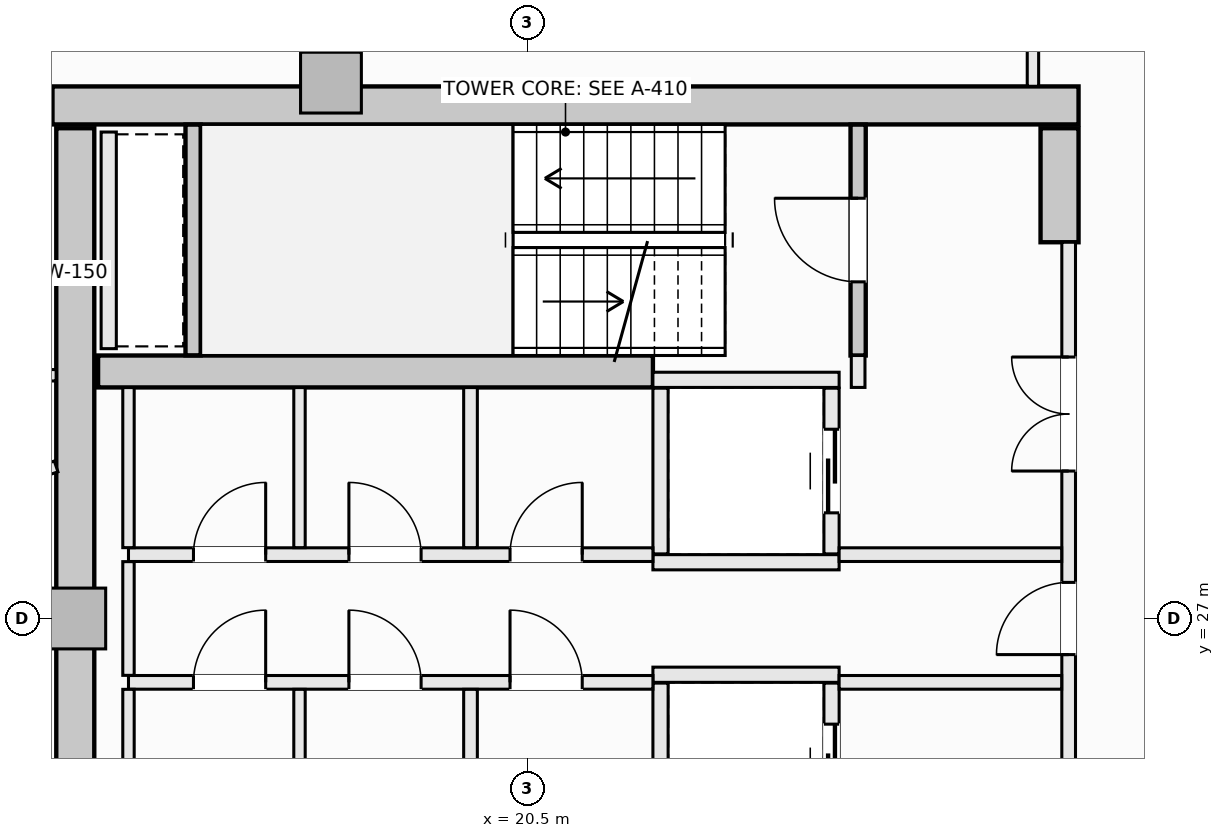
"""IFC4 building model, lengths in metres.
Left out: names, types, materials, properties, quantities, classifications, styles, units other than length and angle.
Written with IfcOpenShell. Run it as: python <this file> out.ifc"""

import sys

from ifc_helpers import new_model, si_unit, direction, frame, frame_2d, origin, origin_2d, place, context, subcontext, project, spatial, rectangle, extrude, element, fill, save


model = new_model("IFC4")
c1 = context("Model", 3, precision=1e-05, world=origin(), true_north=direction((0.0, 1.0)))
c2 = subcontext(c1, "Body", "Model", "MODEL_VIEW")
j1 = project(units=[si_unit("LENGTHUNIT", "METRE"), si_unit("PLANEANGLEUNIT", "RADIAN")], contexts=[c1])
p1 = place(None, origin())
s1 = spatial("IfcSite", under=j1, at=p1, CompositionType="ELEMENT")
p2 = place(p1, origin())
s2 = spatial("IfcBuilding", under=s1, at=p2, CompositionType="ELEMENT")
p3 = place(p2, frame((0.0, 0.0, 272.3)))
s3 = spatial("IfcBuildingStorey", under=s2, at=p3, CompositionType="ELEMENT", Elevation=272.3)
p4 = place(p3, frame((14.25, 33.75, -0.27), z_axis=(0.0, 0.0, 1.0), x_axis=(1.0, 0.0, 0.0)))
e1 = element("IfcWall", 1, at=p4, inside=s3, PredefinedType="SHEAR", context=c2, shape_type="SweptSolid", body=[
    extrude(rectangle(XDim=13.5, YDim=0.5, at=frame_2d((6.75, 0.0))), origin(), (0.0, 0.0, 1.0), 3.25),
])
p5 = place(p3, frame((14.55, 20.55, -0.27), z_axis=(0.0, 0.0, 1.0), x_axis=(0.0, 1.0, 0.0)))
e2 = element("IfcWall", 2, at=p5, inside=s3, PredefinedType="SHEAR", context=c2, shape_type="SweptSolid", body=[
    extrude(rectangle(XDim=12.9, YDim=0.5, at=frame_2d((6.45, 0.0))), origin(), (0.0, 0.0, 1.0), 3.25),
])
p6 = place(p3, frame((27.5, 31.95, -0.27), z_axis=(0.0, 0.0, 1.0), x_axis=(0.0, 1.0, 0.0)))
e3 = element("IfcWall", 3, at=p6, inside=s3, PredefinedType="SHEAR", context=c2, shape_type="SweptSolid", body=[
    extrude(rectangle(XDim=1.5, YDim=0.5, at=frame_2d((0.75, 0.0))), origin(), (0.0, 0.0, 1.0), 3.25),
])
p7 = place(p3, frame((14.85, 30.25, -0.27), z_axis=(0.0, 0.0, 1.0), x_axis=(1.0, 0.0, 0.0)))
e4 = element("IfcWall", 4, at=p7, inside=s3, PredefinedType="SHEAR", context=c2, shape_type="SweptSolid", body=[
    extrude(rectangle(XDim=7.3, YDim=0.42, at=frame_2d((3.65, 0.0))), origin(), (0.0, 0.0, 1.0), 3.25),
])
for number, where, z_axis, x_axis in (
    (5, (17.914, 34.05, -0.27), (0.0, 0.0, 1.0), (1.0, 0.0, 0.0)),
    (6, (14.55, 27.0, -0.27), (0.0, 0.0, 1.0), (1.0, 0.0, 0.0)),
):
    element("IfcColumn", number, at=place(p3, frame(where, z_axis=z_axis, x_axis=x_axis)), inside=s3, PredefinedType="PILASTER", context=c2, shape_type="SweptSolid", body=[
        extrude(rectangle(XDim=0.8, YDim=0.8, at=origin_2d()), origin(), (0.0, 0.0, 1.0), 3.25),
    ])
p8 = place(p3, frame((24.85, 30.46, -0.27), z_axis=(0.0, 0.0, 1.0), x_axis=(0.0, 1.0, 0.0)))
e7 = element("IfcWall", 7, at=p8, inside=s3, PredefinedType="SHEAR", context=c2, shape_type="SweptSolid", body=[
    extrude(rectangle(XDim=3.038, YDim=0.2, at=frame_2d((1.519, 0.0))), origin(), (0.0, 0.0, 1.0), 3.25),
])
p9 = place(p8, frame((0.969, 0.0, 0.27)))
e8 = element("IfcOpeningElement", 8, at=p9, cuts=e7, PredefinedType="OPENING", context=c2, shape_type="SweptSolid", body=[
    extrude(rectangle(XDim=1.1, YDim=2.15, at=frame_2d((0.55, 1.075))), frame((0.0, 0.11, 0.0), z_axis=(0.0, -1.0, 0.0), x_axis=(1.0, 0.0, 0.0)), (0.0, 0.0, 1.0), 0.22),
])
p10 = place(p3, frame((16.1, 30.462, -0.27), z_axis=(0.0, 0.0, 1.0), x_axis=(0.0, 1.0, 0.0)))
e9 = element("IfcWall", 9, at=p10, inside=s3, PredefinedType="SHEAR", context=c2, shape_type="SweptSolid", body=[
    extrude(rectangle(XDim=3.036, YDim=0.2, at=frame_2d((1.518, 0.0))), origin(), (0.0, 0.0, 1.0), 3.25),
])
for number, where, z_axis, x_axis in (
    (10, (22.15, 30.14, 0.0), (0.0, 0.0, 1.0), (1.0, 0.0, 0.0)),
    (11, (22.15, 27.74, 0.0), (0.0, 0.0, 1.0), (1.0, 0.0, 0.0)),
):
    element("IfcWall", number, at=place(p3, frame(where, z_axis=z_axis, x_axis=x_axis)), inside=s3, PredefinedType="SOLIDWALL", context=c2, shape_type="SweptSolid", body=[
        extrude(rectangle(XDim=2.45, YDim=0.2, at=frame_2d((1.225, 0.0))), origin(), (0.0, 0.0, 1.0), 2.98),
    ])
p11 = place(p3, frame((22.25, 27.85, 0.0), z_axis=(0.0, 0.0, 1.0), x_axis=(0.0, 1.0, 0.0)))
e12 = element("IfcWall", 12, at=p11, inside=s3, PredefinedType="SOLIDWALL", context=c2, shape_type="SweptSolid", body=[
    extrude(rectangle(XDim=2.18, YDim=0.2, at=frame_2d((1.09, 0.0))), origin(), (0.0, 0.0, 1.0), 2.98),
])
p12 = place(p3, frame((24.5, 27.85, 0.0), z_axis=(0.0, 0.0, 1.0), x_axis=(0.0, 1.0, 0.0)))
e13 = element("IfcWall", 13, at=p12, inside=s3, PredefinedType="SOLIDWALL", context=c2, shape_type="SweptSolid", body=[
    extrude(rectangle(XDim=2.18, YDim=0.2, at=frame_2d((1.09, 0.0))), origin(), (0.0, 0.0, 1.0), 2.98),
])
p13 = place(p12, frame((0.54, 0.0, 0.0)))
e14 = element("IfcOpeningElement", 14, at=p13, cuts=e13, PredefinedType="OPENING", context=c2, shape_type="SweptSolid", body=[
    extrude(rectangle(XDim=1.1, YDim=2.2, at=frame_2d((0.55, 1.1))), frame((0.0, 0.11, 0.0), z_axis=(0.0, -1.0, 0.0), x_axis=(1.0, 0.0, 0.0)), (0.0, 0.0, 1.0), 0.22),
])
p14 = place(p3, frame((22.15, 26.26, 0.0), z_axis=(0.0, 0.0, 1.0), x_axis=(1.0, 0.0, 0.0)))
e15 = element("IfcWall", 15, at=p14, inside=s3, PredefinedType="SOLIDWALL", context=c2, shape_type="SweptSolid", body=[
    extrude(rectangle(XDim=2.45, YDim=0.2, at=frame_2d((1.225, 0.0))), origin(), (0.0, 0.0, 1.0), 2.98),
])
p15 = place(p3, frame((22.25, 23.97, 0.0), z_axis=(0.0, 0.0, 1.0), x_axis=(0.0, 1.0, 0.0)))
e16 = element("IfcWall", 16, at=p15, inside=s3, PredefinedType="SOLIDWALL", context=c2, shape_type="SweptSolid", body=[
    extrude(rectangle(XDim=2.18, YDim=0.2, at=frame_2d((1.09, 0.0))), origin(), (0.0, 0.0, 1.0), 2.98),
])
p16 = place(p3, frame((24.5, 23.97, 0.0), z_axis=(0.0, 0.0, 1.0), x_axis=(0.0, 1.0, 0.0)))
e17 = element("IfcWall", 17, at=p16, inside=s3, PredefinedType="SOLIDWALL", context=c2, shape_type="SweptSolid", body=[
    extrude(rectangle(XDim=2.18, YDim=0.2, at=frame_2d((1.09, 0.0))), origin(), (0.0, 0.0, 1.0), 2.98),
])
p17 = place(p16, frame((0.54, 0.0, 0.0)))
e18 = element("IfcOpeningElement", 18, at=p17, cuts=e17, PredefinedType="OPENING", context=c2, shape_type="SweptSolid", body=[
    extrude(rectangle(XDim=1.1, YDim=2.2, at=frame_2d((0.55, 1.1))), frame((0.0, 0.11, 0.0), z_axis=(0.0, -1.0, 0.0), x_axis=(1.0, 0.0, 0.0)), (0.0, 0.0, 1.0), 0.22),
])
p18 = place(p3, frame((14.99, 30.55, 0.0), z_axis=(0.0, 0.0, 1.0), x_axis=(0.0, 1.0, 0.0)))
e19 = element("IfcWall", 19, at=p18, inside=s3, PredefinedType="SOLIDWALL", context=c2, shape_type="SweptSolid", body=[
    extrude(rectangle(XDim=2.85, YDim=0.2, at=frame_2d((1.425, 0.0))), origin(), (0.0, 0.0, 1.0), 2.98),
])
p19 = place(p3, frame((24.85, 30.04, 0.0), z_axis=(0.0, 0.0, 1.0), x_axis=(0.0, 1.0, 0.0)))
e20 = element("IfcWall", 20, at=p19, inside=s3, PredefinedType="SOLIDWALL", context=c2, shape_type="SweptSolid", body=[
    extrude(rectangle(XDim=0.42, YDim=0.18, at=frame_2d((0.21, 0.0))), origin(), (0.0, 0.0, 1.0), 2.98),
])
p20 = place(p3, frame((27.62, 22.05, 0.0), z_axis=(0.0, 0.0, 1.0), x_axis=(0.0, 1.0, 0.0)))
e21 = element("IfcWall", 21, at=p20, inside=s3, PredefinedType="SOLIDWALL", context=c2, shape_type="SweptSolid", body=[
    extrude(rectangle(XDim=9.9, YDim=0.18, at=frame_2d((4.95, 0.0))), origin(), (0.0, 0.0, 1.0), 2.98),
])
p21 = place(p20, frame((4.475, 0.0, 0.0)))
e22 = element("IfcOpeningElement", 22, at=p21, cuts=e21, PredefinedType="OPENING", context=c2, shape_type="SweptSolid", body=[
    extrude(rectangle(XDim=0.95, YDim=2.1, at=frame_2d((0.475, 1.05))), frame((0.0, 0.1, 0.0), z_axis=(0.0, -1.0, 0.0), x_axis=(1.0, 0.0, 0.0)), (0.0, 0.0, 1.0), 0.2),
])
p22 = place(p20, frame((6.89, 0.0, 0.0)))
e23 = element("IfcOpeningElement", 23, at=p22, cuts=e21, PredefinedType="OPENING", context=c2, shape_type="SweptSolid", body=[
    extrude(rectangle(XDim=1.5, YDim=2.2, at=frame_2d((0.75, 1.1))), frame((0.0, 0.1, 0.0), z_axis=(0.0, -1.0, 0.0), x_axis=(1.0, 0.0, 0.0)), (0.0, 0.0, 1.0), 0.2),
])
p23 = place(p20, frame((1.51, 0.0, 0.0)))
e24 = element("IfcOpeningElement", 24, at=p23, cuts=e21, PredefinedType="OPENING", context=c2, shape_type="SweptSolid", body=[
    extrude(rectangle(XDim=1.5, YDim=2.2, at=frame_2d((0.75, 1.1))), frame((0.0, 0.1, 0.0), z_axis=(0.0, -1.0, 0.0), x_axis=(1.0, 0.0, 0.0)), (0.0, 0.0, 1.0), 0.2),
])
p24 = place(p3, frame((15.25, 27.84, 0.0), z_axis=(0.0, 0.0, 1.0), x_axis=(1.0, 0.0, 0.0)))
e25 = element("IfcWall", 25, at=p24, inside=s3, PredefinedType="SOLIDWALL", context=c2, shape_type="SweptSolid", body=[
    extrude(rectangle(XDim=6.9, YDim=0.18, at=frame_2d((3.45, 0.0))), origin(), (0.0, 0.0, 1.0), 2.98),
])
p25 = place(p24, frame((5.02, 0.0, 0.0)))
e26 = element("IfcOpeningElement", 26, at=p25, cuts=e25, PredefinedType="OPENING", context=c2, shape_type="SweptSolid", body=[
    extrude(rectangle(XDim=0.95, YDim=2.1, at=frame_2d((0.475, 1.05))), frame((0.0, 0.1, 0.0), z_axis=(0.0, -1.0, 0.0), x_axis=(1.0, 0.0, 0.0)), (0.0, 0.0, 1.0), 0.2),
])
p26 = place(p24, frame((0.855, 0.0, 0.0)))
e27 = element("IfcOpeningElement", 27, at=p26, cuts=e25, PredefinedType="OPENING", context=c2, shape_type="SweptSolid", body=[
    extrude(rectangle(XDim=0.95, YDim=2.1, at=frame_2d((0.475, 1.05))), frame((0.0, 0.1, 0.0), z_axis=(0.0, -1.0, 0.0), x_axis=(1.0, 0.0, 0.0)), (0.0, 0.0, 1.0), 0.2),
])
p27 = place(p24, frame((2.9, 0.0, 0.0)))
e28 = element("IfcOpeningElement", 28, at=p27, cuts=e25, PredefinedType="OPENING", context=c2, shape_type="SweptSolid", body=[
    extrude(rectangle(XDim=0.95, YDim=2.1, at=frame_2d((0.475, 1.05))), frame((0.0, 0.1, 0.0), z_axis=(0.0, -1.0, 0.0), x_axis=(1.0, 0.0, 0.0)), (0.0, 0.0, 1.0), 0.2),
])
p28 = place(p3, frame((24.6, 27.84, 0.0), z_axis=(0.0, 0.0, 1.0), x_axis=(1.0, 0.0, 0.0)))
e29 = element("IfcWall", 29, at=p28, inside=s3, PredefinedType="SOLIDWALL", context=c2, shape_type="SweptSolid", body=[
    extrude(rectangle(XDim=2.928, YDim=0.18, at=frame_2d((1.464, 0.0))), origin(), (0.0, 0.0, 1.0), 2.98),
])
p29 = place(p3, frame((15.25, 26.16, 0.0), z_axis=(0.0, 0.0, 1.0), x_axis=(1.0, 0.0, 0.0)))
e30 = element("IfcWall", 30, at=p29, inside=s3, PredefinedType="SOLIDWALL", context=c2, shape_type="SweptSolid", body=[
    extrude(rectangle(XDim=6.9, YDim=0.18, at=frame_2d((3.45, 0.0))), origin(), (0.0, 0.0, 1.0), 2.98),
])
p30 = place(p29, frame((5.02, 0.0, 0.0)))
e31 = element("IfcOpeningElement", 31, at=p30, cuts=e30, PredefinedType="OPENING", context=c2, shape_type="SweptSolid", body=[
    extrude(rectangle(XDim=0.95, YDim=2.1, at=frame_2d((0.475, 1.05))), frame((0.0, 0.1, 0.0), z_axis=(0.0, -1.0, 0.0), x_axis=(1.0, 0.0, 0.0)), (0.0, 0.0, 1.0), 0.2),
])
p31 = place(p29, frame((0.855, 0.0, 0.0)))
e32 = element("IfcOpeningElement", 32, at=p31, cuts=e30, PredefinedType="OPENING", context=c2, shape_type="SweptSolid", body=[
    extrude(rectangle(XDim=0.95, YDim=2.1, at=frame_2d((0.475, 1.05))), frame((0.0, 0.1, 0.0), z_axis=(0.0, -1.0, 0.0), x_axis=(1.0, 0.0, 0.0)), (0.0, 0.0, 1.0), 0.2),
])
p32 = place(p29, frame((2.9, 0.0, 0.0)))
e33 = element("IfcOpeningElement", 33, at=p32, cuts=e30, PredefinedType="OPENING", context=c2, shape_type="SweptSolid", body=[
    extrude(rectangle(XDim=0.95, YDim=2.1, at=frame_2d((0.475, 1.05))), frame((0.0, 0.1, 0.0), z_axis=(0.0, -1.0, 0.0), x_axis=(1.0, 0.0, 0.0)), (0.0, 0.0, 1.0), 0.2),
])
p33 = place(p3, frame((24.6, 26.16, 0.0), z_axis=(0.0, 0.0, 1.0), x_axis=(1.0, 0.0, 0.0)))
e34 = element("IfcWall", 34, at=p33, inside=s3, PredefinedType="SOLIDWALL", context=c2, shape_type="SweptSolid", body=[
    extrude(rectangle(XDim=2.928, YDim=0.18, at=frame_2d((1.464, 0.0))), origin(), (0.0, 0.0, 1.0), 2.98),
])
p34 = place(p3, frame((15.25, 23.962, 0.0), z_axis=(0.0, 0.0, 1.0), x_axis=(0.0, 1.0, 0.0)))
e35 = element("IfcWall", 35, at=p34, inside=s3, PredefinedType="PARTITIONING", context=c2, shape_type="SweptSolid", body=[
    extrude(rectangle(XDim=2.106, YDim=0.15, at=frame_2d((1.053, 0.0))), origin(), (0.0, 0.0, 1.0), 2.98),
])
p35 = place(p3, frame((15.25, 26.252, 0.0), z_axis=(0.0, 0.0, 1.0), x_axis=(0.0, 1.0, 0.0)))
e36 = element("IfcWall", 36, at=p35, inside=s3, PredefinedType="PARTITIONING", context=c2, shape_type="SweptSolid", body=[
    extrude(rectangle(XDim=1.496, YDim=0.15, at=frame_2d((0.748, 0.0))), origin(), (0.0, 0.0, 1.0), 2.98),
])
p36 = place(p3, frame((15.25, 27.932, 0.0), z_axis=(0.0, 0.0, 1.0), x_axis=(0.0, 1.0, 0.0)))
e37 = element("IfcWall", 37, at=p36, inside=s3, PredefinedType="PARTITIONING", context=c2, shape_type="SweptSolid", body=[
    extrude(rectangle(XDim=2.106, YDim=0.15, at=frame_2d((1.053, 0.0))), origin(), (0.0, 0.0, 1.0), 2.98),
])
for number, where, z_axis, x_axis in (
    (38, (19.75, 23.962, 0.0), (0.0, 0.0, 1.0), (0.0, 1.0, 0.0)),
    (39, (19.75, 27.932, 0.0), (0.0, 0.0, 1.0), (0.0, 1.0, 0.0)),
):
    element("IfcWall", number, at=place(p3, frame(where, z_axis=z_axis, x_axis=x_axis)), inside=s3, PredefinedType="SOLIDWALL", context=c2, shape_type="SweptSolid", body=[
        extrude(rectangle(XDim=2.106, YDim=0.18, at=frame_2d((1.053, 0.0))), origin(), (0.0, 0.0, 1.0), 2.98),
    ])
p37 = place(p3, frame((12.0, 30.2, 0.0), z_axis=(0.0, 0.0, 1.0), x_axis=(1.0, 0.0, 0.0)))
e40 = element("IfcWall", 40, at=p37, inside=s3, PredefinedType="PARTITIONING", context=c2, shape_type="SweptSolid", body=[
    extrude(rectangle(XDim=2.298, YDim=0.15, at=frame_2d((1.149, 0.0))), origin(), (0.0, 0.0, 1.0), 2.98),
])
p38 = place(p37, frame((0.699, 0.0, 0.0)))
e41 = element("IfcOpeningElement", 41, at=p38, cuts=e40, PredefinedType="OPENING", context=c2, shape_type="SweptSolid", body=[
    extrude(rectangle(XDim=0.9, YDim=2.1, at=frame_2d((0.45, 1.05))), frame((0.0, 0.085, 0.0), z_axis=(0.0, -1.0, 0.0), x_axis=(1.0, 0.0, 0.0)), (0.0, 0.0, 1.0), 0.17),
])
for number, where, z_axis, x_axis in (
    (42, (17.5, 23.962, 0.0), (0.0, 0.0, 1.0), (0.0, 1.0, 0.0)),
    (43, (17.5, 27.932, 0.0), (0.0, 0.0, 1.0), (0.0, 1.0, 0.0)),
):
    element("IfcWall", number, at=place(p3, frame(where, z_axis=z_axis, x_axis=x_axis)), inside=s3, PredefinedType="PARTITIONING", context=c2, shape_type="SweptSolid", body=[
        extrude(rectangle(XDim=2.106, YDim=0.15, at=frame_2d((1.053, 0.0))), origin(), (0.0, 0.0, 1.0), 2.98),
    ])
p39 = place(p3, frame((27.15, 34.002, 0.0), z_axis=(0.0, 0.0, 1.0), x_axis=(0.0, 1.0, 0.0)))
e44 = element("IfcWall", 44, at=p39, inside=s3, PredefinedType="PARTITIONING", context=c2, shape_type="SweptSolid", body=[
    extrude(rectangle(XDim=4.198, YDim=0.15, at=frame_2d((2.099, 0.0))), origin(), (0.0, 0.0, 1.0), 2.98),
])
p40 = place(p39, frame((1.998, 0.0, 0.0)))
e45 = element("IfcOpeningElement", 45, at=p40, cuts=e44, PredefinedType="OPENING", context=c2, shape_type="SweptSolid", body=[
    extrude(rectangle(XDim=0.95, YDim=2.1, at=frame_2d((0.475, 1.05))), frame((0.0, 0.085, 0.0), z_axis=(0.0, -1.0, 0.0), x_axis=(1.0, 0.0, 0.0)), (0.0, 0.0, 1.0), 0.17),
])
p41 = place(p3, frame((9.83, 27.501, 0.0), z_axis=(0.0, 0.0, 1.0), x_axis=(0.948028536058, 0.318185315217, 0.0)))
e46 = element("IfcWall", 46, at=p41, inside=s3, PredefinedType="PARTITIONING", context=c2, shape_type="SweptSolid", body=[
    extrude(rectangle(XDim=4.713, YDim=0.15, at=frame_2d((2.356, 0.0))), origin(), (0.0, 0.0, 1.0), 2.98),
])
p42 = place(p9, origin())
e47 = element("IfcDoor", 47, at=p42, inside=s3, OperationType="SINGLE_SWING_RIGHT", PredefinedType="DOOR", context=c2, shape_type="SweptSolid", body=[
    extrude(rectangle(XDim=1.1, YDim=2.15, at=frame_2d((0.55, 1.075))), frame((0.0, 0.025, 0.0), z_axis=(0.0, -1.0, 0.0), x_axis=(1.0, 0.0, 0.0)), (0.0, 0.0, 1.0), 0.05),
])
fill(e8, e47)
p43 = place(p13, origin())
e48 = element("IfcDoor", 48, at=p43, inside=s3, OperationType="SLIDING_TO_LEFT", PredefinedType="DOOR", context=c2, shape_type="SweptSolid", body=[
    extrude(rectangle(XDim=1.1, YDim=2.2, at=frame_2d((0.55, 1.1))), frame((0.0, 0.025, 0.0), z_axis=(0.0, -1.0, 0.0), x_axis=(1.0, 0.0, 0.0)), (0.0, 0.0, 1.0), 0.05),
])
fill(e14, e48)
p44 = place(p17, origin())
e49 = element("IfcDoor", 49, at=p44, inside=s3, OperationType="SLIDING_TO_LEFT", PredefinedType="DOOR", context=c2, shape_type="SweptSolid", body=[
    extrude(rectangle(XDim=1.1, YDim=2.2, at=frame_2d((0.55, 1.1))), frame((0.0, 0.025, 0.0), z_axis=(0.0, -1.0, 0.0), x_axis=(1.0, 0.0, 0.0)), (0.0, 0.0, 1.0), 0.05),
])
fill(e18, e49)
p45 = place(p21, origin())
e50 = element("IfcDoor", 50, at=p45, inside=s3, OperationType="SINGLE_SWING_LEFT", PredefinedType="DOOR", context=c2, shape_type="SweptSolid", body=[
    extrude(rectangle(XDim=0.95, YDim=2.1, at=frame_2d((0.475, 1.05))), frame((0.0, 0.025, 0.0), z_axis=(0.0, -1.0, 0.0), x_axis=(1.0, 0.0, 0.0)), (0.0, 0.0, 1.0), 0.05),
])
fill(e22, e50)
p46 = place(p22, origin())
e51 = element("IfcDoor", 51, at=p46, inside=s3, OperationType="DOUBLE_DOOR_SINGLE_SWING", PredefinedType="DOOR", context=c2, shape_type="SweptSolid", body=[
    extrude(rectangle(XDim=1.5, YDim=2.2, at=frame_2d((0.75, 1.1))), frame((0.0, 0.025, 0.0), z_axis=(0.0, -1.0, 0.0), x_axis=(1.0, 0.0, 0.0)), (0.0, 0.0, 1.0), 0.05),
])
fill(e23, e51)
p47 = place(p25, origin())
e52 = element("IfcDoor", 52, at=p47, inside=s3, OperationType="SINGLE_SWING_RIGHT", PredefinedType="DOOR", context=c2, shape_type="SweptSolid", body=[
    extrude(rectangle(XDim=0.95, YDim=2.1, at=frame_2d((0.475, 1.05))), frame((0.0, 0.025, 0.0), z_axis=(0.0, -1.0, 0.0), x_axis=(1.0, 0.0, 0.0)), (0.0, 0.0, 1.0), 0.05),
])
fill(e26, e52)
p48 = place(p30, origin())
e53 = element("IfcDoor", 53, at=p48, inside=s3, OperationType="SINGLE_SWING_LEFT", PredefinedType="DOOR", context=c2, shape_type="SweptSolid", body=[
    extrude(rectangle(XDim=0.95, YDim=2.1, at=frame_2d((0.475, 1.05))), frame((0.0, 0.025, 0.0), z_axis=(0.0, -1.0, 0.0), x_axis=(1.0, 0.0, 0.0)), (0.0, 0.0, 1.0), 0.05),
])
fill(e31, e53)
p49 = place(p26, origin())
e54 = element("IfcDoor", 54, at=p49, inside=s3, OperationType="SINGLE_SWING_RIGHT", PredefinedType="DOOR", context=c2, shape_type="SweptSolid", body=[
    extrude(rectangle(XDim=0.95, YDim=2.1, at=frame_2d((0.475, 1.05))), frame((0.0, 0.025, 0.0), z_axis=(0.0, -1.0, 0.0), x_axis=(1.0, 0.0, 0.0)), (0.0, 0.0, 1.0), 0.05),
])
fill(e27, e54)
p50 = place(p27, origin())
e55 = element("IfcDoor", 55, at=p50, inside=s3, OperationType="SINGLE_SWING_LEFT", PredefinedType="DOOR", context=c2, shape_type="SweptSolid", body=[
    extrude(rectangle(XDim=0.95, YDim=2.1, at=frame_2d((0.475, 1.05))), frame((0.0, 0.025, 0.0), z_axis=(0.0, -1.0, 0.0), x_axis=(1.0, 0.0, 0.0)), (0.0, 0.0, 1.0), 0.05),
])
fill(e28, e55)
p51 = place(p31, origin())
e56 = element("IfcDoor", 56, at=p51, inside=s3, OperationType="SINGLE_SWING_RIGHT", PredefinedType="DOOR", context=c2, shape_type="SweptSolid", body=[
    extrude(rectangle(XDim=0.95, YDim=2.1, at=frame_2d((0.475, 1.05))), frame((0.0, 0.025, 0.0), z_axis=(0.0, -1.0, 0.0), x_axis=(1.0, 0.0, 0.0)), (0.0, 0.0, 1.0), 0.05),
])
fill(e32, e56)
p52 = place(p32, origin())
e57 = element("IfcDoor", 57, at=p52, inside=s3, OperationType="SINGLE_SWING_LEFT", PredefinedType="DOOR", context=c2, shape_type="SweptSolid", body=[
    extrude(rectangle(XDim=0.95, YDim=2.1, at=frame_2d((0.475, 1.05))), frame((0.0, 0.025, 0.0), z_axis=(0.0, -1.0, 0.0), x_axis=(1.0, 0.0, 0.0)), (0.0, 0.0, 1.0), 0.05),
])
fill(e33, e57)
save(model, sys.argv[1])
